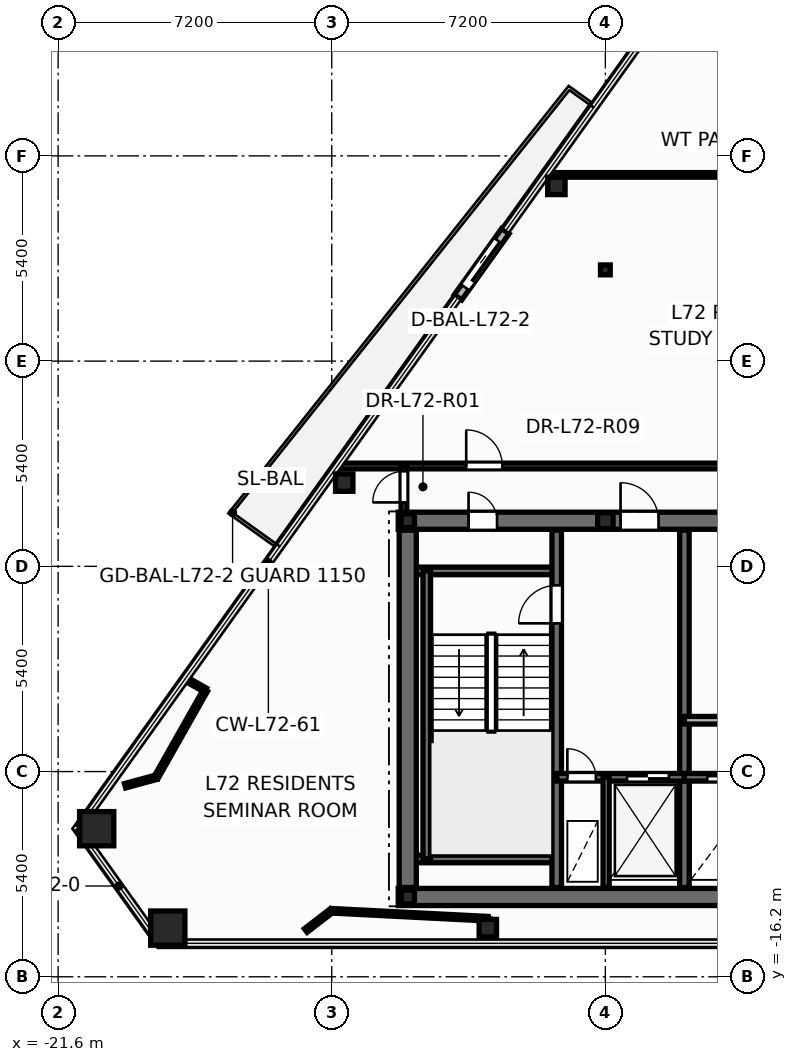
"""IFC4 building model, lengths in metres.
Left out: names, types, materials, properties, quantities, classifications, styles, units other than length and angle.
Written with IfcOpenShell. Run it as: python <this file> out.ifc"""

import sys

from ifc_helpers import new_model, si_unit, direction, frame, frame_2d, origin, origin_2d, place, context, subcontext, project, spatial, rectangle, hollow_rectangle, hollow_circle, i_section, extrude, element, fill, save


model = new_model("IFC4")
c1 = context("Model", 3, precision=1e-05, world=origin(), true_north=direction((0.0, 1.0)))
c2 = subcontext(c1, "Body", "Model", "MODEL_VIEW")
j1 = project(units=[si_unit("LENGTHUNIT", "METRE"), si_unit("PLANEANGLEUNIT", "RADIAN")], contexts=[c1])
p1 = place(None, origin())
s1 = spatial("IfcSite", under=j1, at=p1, CompositionType="ELEMENT")
p2 = place(p1, origin())
s2 = spatial("IfcBuilding", under=s1, at=p2, CompositionType="ELEMENT")
p3 = place(p2, frame((0.0, 0.0, 274.2)))
s3 = spatial("IfcBuildingStorey", under=s2, at=p3, CompositionType="ELEMENT", Elevation=274.2)
for number, where, z_axis, x_axis in (
    (1, (-20.585, -12.303, 0.0), (0.0, 0.0, 1.0), (1.0, 0.0, 0.0)),
    (2, (-18.714, -14.919, 0.0), (0.0, 0.0, 1.0), (1.0, 0.0, 0.0)),
):
    element("IfcColumn", number, at=place(p3, frame(where, z_axis=z_axis, x_axis=x_axis)), inside=s3, PredefinedType="COLUMN", context=c2, shape_type="SweptSolid", body=[
        extrude(hollow_rectangle(XDim=0.9, YDim=0.9, WallThickness=0.04, at=origin_2d()), origin(), (0.0, 0.0, 1.0), 3.6),
    ])
for number, where, z_axis, x_axis in (
    (3, (-10.293, -14.919, 0.0), (0.0, 0.0, 1.0), (1.0, 0.0, 0.0)),
    (4, (-8.489, 4.61, 0.0), (0.0, 0.0, 1.0), (1.0, 0.0, 0.0)),
    (5, (-14.072, -3.196, 0.0), (0.0, 0.0, 1.0), (1.0, 0.0, 0.0)),
):
    element("IfcColumn", number, at=place(p3, frame(where, z_axis=z_axis, x_axis=x_axis)), inside=s3, PredefinedType="COLUMN", context=c2, shape_type="SweptSolid", body=[
        extrude(hollow_circle(Radius=0.229, WallThickness=0.016, at=origin_2d()), origin(), (0.0, 0.0, 1.0), 3.6),
    ])
for number, where, z_axis, x_axis in (
    (6, (-12.4, -14.1, 0.0), (0.0, 0.0, 1.0), (1.0, 0.0, 0.0)),
    (7, (-12.4, -4.2, 0.0), (0.0, 0.0, 1.0), (1.0, 0.0, 0.0)),
):
    element("IfcColumn", number, at=place(p3, frame(where, z_axis=z_axis, x_axis=x_axis)), inside=s3, PredefinedType="COLUMN", context=c2, shape_type="SweptSolid", body=[
        extrude(i_section(OverallWidth=0.352, OverallDepth=0.359, WebThickness=0.018, FlangeThickness=0.026, at=origin_2d()), origin(), (0.0, 0.0, 1.0), 3.6),
    ])
p4 = place(p3, frame((-7.2, -4.2, 0.0), z_axis=(0.0, 0.0, 1.0), x_axis=(1.0, 0.0, 0.0)))
e8 = element("IfcColumn", 8, at=p4, inside=s3, PredefinedType="PILASTER", context=c2, shape_type="SweptSolid", body=[
    extrude(i_section(OverallWidth=0.405, OverallDepth=0.414, WebThickness=0.022, FlangeThickness=0.032, at=origin_2d()), origin(), (0.0, 0.0, 1.0), 3.6),
])
p5 = place(p3, frame((-7.2, 2.4, 0.0), z_axis=(0.0, 0.0, 1.0), x_axis=(1.0, 0.0, 0.0)))
e9 = element("IfcColumn", 9, at=p5, inside=s3, PredefinedType="COLUMN", context=c2, shape_type="SweptSolid", body=[
    extrude(i_section(OverallWidth=0.256, OverallDepth=0.26, WebThickness=0.01, FlangeThickness=0.017, at=origin_2d()), origin(), (0.0, 0.0, 1.0), 3.6),
])
p6 = place(p3, frame((-9.831, 3.42, -0.015), z_axis=(0.0, 0.0, 1.0), x_axis=(-0.581756116184, -0.81336327756, 0.0)))
e10 = element("IfcWall", 10, at=p6, inside=s3, PredefinedType="STANDARD", context=c2, shape_type="SweptSolid", body=[
    extrude(rectangle(XDim=2.14, YDim=0.24, at=frame_2d((1.07, 0.0))), origin(), (0.0, 0.0, 1.0), 2.878),
])
p7 = place(p6, frame((0.32, 0.0, 0.015)))
e11 = element("IfcOpeningElement", 11, at=p7, cuts=e10, PredefinedType="OPENING", context=c2, shape_type="SweptSolid", body=[
    extrude(rectangle(XDim=1.506, YDim=2.204, at=frame_2d((0.75, 1.102))), frame((0.0, 0.13, 0.0), z_axis=(0.0, -1.0, 0.0), x_axis=(1.0, 0.0, 0.0)), (0.0, 0.0, 1.0), 0.26),
])
p8 = place(p3, frame((-12.65, -14.1, 0.0), z_axis=(0.0, 0.0, 1.0), x_axis=(1.0, 0.0, 0.0)))
e12 = element("IfcWall", 12, at=p8, inside=s3, PredefinedType="SHEAR", context=c2, shape_type="SweptSolid", body=[
    extrude(rectangle(XDim=25.3, YDim=0.45, at=frame_2d((12.65, 0.0))), origin(), (0.0, 0.0, 1.0), 3.6),
])
p9 = place(p3, frame((-12.65, -4.2, 0.0), z_axis=(0.0, 0.0, 1.0), x_axis=(1.0, 0.0, 0.0)))
e13 = element("IfcWall", 13, at=p9, inside=s3, PredefinedType="SHEAR", context=c2, shape_type="SweptSolid", body=[
    extrude(rectangle(XDim=25.3, YDim=0.45, at=frame_2d((12.65, 0.0))), origin(), (0.0, 0.0, 1.0), 3.6),
])
p10 = place(p9, frame((1.85, 0.0, 0.0)))
e14 = element("IfcOpeningElement", 14, at=p10, cuts=e13, PredefinedType="OPENING", context=c2, shape_type="SweptSolid", body=[
    extrude(rectangle(XDim=0.756, YDim=2.054, at=frame_2d((0.375, 1.027))), frame((0.0, 0.235, 0.0), z_axis=(0.0, -1.0, 0.0), x_axis=(1.0, 0.0, 0.0)), (0.0, 0.0, 1.0), 0.47),
])
p11 = place(p9, frame((22.65, 0.0, 0.0)))
e15 = element("IfcOpeningElement", 15, at=p11, cuts=e13, PredefinedType="OPENING", context=c2, shape_type="SweptSolid", body=[
    extrude(rectangle(XDim=0.756, YDim=2.054, at=frame_2d((0.375, 1.027))), frame((0.0, 0.235, 0.0), z_axis=(0.0, -1.0, 0.0), x_axis=(1.0, 0.0, 0.0)), (0.0, 0.0, 1.0), 0.47),
])
p12 = place(p9, frame((5.85, 0.0, 0.0)))
e16 = element("IfcOpeningElement", 16, at=p12, cuts=e13, PredefinedType="OPENING", context=c2, shape_type="SweptSolid", body=[
    extrude(rectangle(XDim=1.006, YDim=2.104, at=frame_2d((0.5, 1.052))), frame((0.0, 0.235, 0.0), z_axis=(0.0, -1.0, 0.0), x_axis=(1.0, 0.0, 0.0)), (0.0, 0.0, 1.0), 0.47),
])
p13 = place(p9, frame((10.35, 0.0, 0.0)))
e17 = element("IfcOpeningElement", 17, at=p13, cuts=e13, PredefinedType="OPENING", context=c2, shape_type="SweptSolid", body=[
    extrude(rectangle(XDim=1.406, YDim=2.154, at=frame_2d((0.7, 1.077))), frame((0.0, 0.235, 0.0), z_axis=(0.0, -1.0, 0.0), x_axis=(1.0, 0.0, 0.0)), (0.0, 0.0, 1.0), 0.47),
])
p14 = place(p9, frame((18.45, 0.0, 0.0)))
e18 = element("IfcOpeningElement", 18, at=p14, cuts=e13, PredefinedType="OPENING", context=c2, shape_type="SweptSolid", body=[
    extrude(rectangle(XDim=1.006, YDim=2.104, at=frame_2d((0.5, 1.052))), frame((0.0, 0.235, 0.0), z_axis=(0.0, -1.0, 0.0), x_axis=(1.0, 0.0, 0.0)), (0.0, 0.0, 1.0), 0.47),
])
for number, where, z_axis, x_axis in (
    (19, (-12.35, -5.52, 0.0), (0.0, 0.0, 1.0), (1.0, 0.0, 0.0)),
    (20, (-12.35, -13.1, 0.0), (0.0, 0.0, 1.0), (1.0, 0.0, 0.0)),
):
    element("IfcWall", number, at=place(p3, frame(where, z_axis=z_axis, x_axis=x_axis)), inside=s3, PredefinedType="SOLIDWALL", context=c2, shape_type="SweptSolid", body=[
        extrude(rectangle(XDim=3.87, YDim=0.2, at=frame_2d((1.935, 0.0))), origin(), (0.0, 0.0, 1.0), 3.6),
    ])
p15 = place(p3, frame((-11.9, -13.1, 0.0), z_axis=(0.0, 0.0, 1.0), x_axis=(0.0, 1.0, 0.0)))
e21 = element("IfcWall", 21, at=p15, inside=s3, PredefinedType="SOLIDWALL", context=c2, shape_type="SweptSolid", body=[
    extrude(rectangle(XDim=7.58, YDim=0.2, at=frame_2d((3.79, 0.0))), origin(), (0.0, 0.0, 1.0), 3.6),
])
p16 = place(p3, frame((-8.48, -13.85, 0.0), z_axis=(0.0, 0.0, 1.0), x_axis=(0.0, 1.0, 0.0)))
e22 = element("IfcWall", 22, at=p16, inside=s3, PredefinedType="SHEAR", context=c2, shape_type="SweptSolid", body=[
    extrude(rectangle(XDim=9.4, YDim=0.25, at=frame_2d((4.7, 0.0))), origin(), (0.0, 0.0, 1.0), 3.6),
])
p17 = place(p16, frame((6.95, 0.0, 0.0)))
e23 = element("IfcOpeningElement", 23, at=p17, cuts=e22, PredefinedType="OPENING", context=c2, shape_type="SweptSolid", body=[
    extrude(rectangle(XDim=1.006, YDim=2.104, at=frame_2d((0.5, 1.052))), frame((0.0, 0.135, 0.0), z_axis=(0.0, -1.0, 0.0), x_axis=(1.0, 0.0, 0.0)), (0.0, 0.0, 1.0), 0.27),
])
p18 = place(p3, frame((-5.12, -13.85, 0.0), z_axis=(0.0, 0.0, 1.0), x_axis=(0.0, 1.0, 0.0)))
e24 = element("IfcWall", 24, at=p18, inside=s3, PredefinedType="SHEAR", context=c2, shape_type="SweptSolid", body=[
    extrude(rectangle(XDim=9.4, YDim=0.25, at=frame_2d((4.7, 0.0))), origin(), (0.0, 0.0, 1.0), 3.6),
])
p19 = place(p3, frame((-8.48, -10.95, 0.0), z_axis=(0.0, 0.0, 1.0), x_axis=(1.0, 0.0, 0.0)))
e25 = element("IfcWall", 25, at=p19, inside=s3, PredefinedType="SOLIDWALL", context=c2, shape_type="SweptSolid", body=[
    extrude(rectangle(XDim=3.36, YDim=0.2, at=frame_2d((1.68, 0.0))), origin(), (0.0, 0.0, 1.0), 3.6),
])
p20 = place(p19, frame((0.28, 0.0, 0.0)))
e26 = element("IfcOpeningElement", 26, at=p20, cuts=e25, PredefinedType="OPENING", context=c2, shape_type="SweptSolid", body=[
    extrude(rectangle(XDim=0.756, YDim=2.054, at=frame_2d((0.375, 1.027))), frame((0.0, 0.11, 0.0), z_axis=(0.0, -1.0, 0.0), x_axis=(1.0, 0.0, 0.0)), (0.0, 0.0, 1.0), 0.22),
])
p21 = place(p19, frame((1.85, 0.0, 0.0)))
e27 = element("IfcOpeningElement", 27, at=p21, cuts=e25, PredefinedType="OPENING", context=c2, shape_type="SweptSolid", body=[
    extrude(rectangle(XDim=1.106, YDim=2.104, at=frame_2d((0.55, 1.052))), frame((0.0, 0.11, 0.0), z_axis=(0.0, -1.0, 0.0), x_axis=(1.0, 0.0, 0.0)), (0.0, 0.0, 1.0), 0.22),
])
p22 = place(p3, frame((-5.12, -10.95, 0.0), z_axis=(0.0, 0.0, 1.0), x_axis=(1.0, 0.0, 0.0)))
e28 = element("IfcWall", 28, at=p22, inside=s3, PredefinedType="SOLIDWALL", context=c2, shape_type="SweptSolid", body=[
    extrude(rectangle(XDim=10.24, YDim=0.2, at=frame_2d((5.12, 0.0))), origin(), (0.0, 0.0, 1.0), 3.6),
])
p23 = place(p22, frame((0.6, 0.0, 0.0)))
e29 = element("IfcOpeningElement", 29, at=p23, cuts=e28, PredefinedType="OPENING", context=c2, shape_type="SweptSolid", body=[
    extrude(rectangle(XDim=1.106, YDim=2.104, at=frame_2d((0.55, 1.052))), frame((0.0, 0.11, 0.0), z_axis=(0.0, -1.0, 0.0), x_axis=(1.0, 0.0, 0.0)), (0.0, 0.0, 1.0), 0.22),
])
p24 = place(p22, frame((2.67, 0.0, 0.0)))
e30 = element("IfcOpeningElement", 30, at=p24, cuts=e28, PredefinedType="OPENING", context=c2, shape_type="SweptSolid", body=[
    extrude(rectangle(XDim=1.106, YDim=2.104, at=frame_2d((0.55, 1.052))), frame((0.0, 0.11, 0.0), z_axis=(0.0, -1.0, 0.0), x_axis=(1.0, 0.0, 0.0)), (0.0, 0.0, 1.0), 0.22),
])
p25 = place(p22, frame((4.57, 0.0, 0.0)))
e31 = element("IfcOpeningElement", 31, at=p25, cuts=e28, PredefinedType="OPENING", context=c2, shape_type="SweptSolid", body=[
    extrude(rectangle(XDim=1.106, YDim=2.104, at=frame_2d((0.55, 1.052))), frame((0.0, 0.11, 0.0), z_axis=(0.0, -1.0, 0.0), x_axis=(1.0, 0.0, 0.0)), (0.0, 0.0, 1.0), 0.22),
])
p26 = place(p22, frame((6.47, 0.0, 0.0)))
e32 = element("IfcOpeningElement", 32, at=p26, cuts=e28, PredefinedType="OPENING", context=c2, shape_type="SweptSolid", body=[
    extrude(rectangle(XDim=1.106, YDim=2.104, at=frame_2d((0.55, 1.052))), frame((0.0, 0.11, 0.0), z_axis=(0.0, -1.0, 0.0), x_axis=(1.0, 0.0, 0.0)), (0.0, 0.0, 1.0), 0.22),
])
p27 = place(p22, frame((8.54, 0.0, 0.0)))
e33 = element("IfcOpeningElement", 33, at=p27, cuts=e28, PredefinedType="OPENING", context=c2, shape_type="SweptSolid", body=[
    extrude(rectangle(XDim=1.106, YDim=2.104, at=frame_2d((0.55, 1.052))), frame((0.0, 0.11, 0.0), z_axis=(0.0, -1.0, 0.0), x_axis=(1.0, 0.0, 0.0)), (0.0, 0.0, 1.0), 0.22),
])
p28 = place(p3, frame((-7.18, -13.85, 0.0), z_axis=(0.0, 0.0, 1.0), x_axis=(0.0, 1.0, 0.0)))
e34 = element("IfcWall", 34, at=p28, inside=s3, PredefinedType="PARTITIONING", context=c2, shape_type="SweptSolid", body=[
    extrude(rectangle(XDim=2.9, YDim=0.16, at=frame_2d((1.45, 0.0))), origin(), (0.0, 0.0, 1.0), 2.57),
])
p29 = place(p3, frame((-12.4, -13.85, 0.0), z_axis=(0.0, 0.0, 1.0), x_axis=(0.0, 1.0, 0.0)))
e35 = element("IfcWall", 35, at=p29, inside=s3, PredefinedType="SHEAR", context=c2, shape_type="SweptSolid", body=[
    extrude(rectangle(XDim=9.4, YDim=0.45, at=frame_2d((4.7, 0.0))), origin(), (0.0, 0.0, 1.0), 3.6),
])
p30 = place(p3, frame((-5.12, -9.45, 0.0), z_axis=(0.0, 0.0, 1.0), x_axis=(1.0, 0.0, 0.0)))
e36 = element("IfcWall", 36, at=p30, inside=s3, PredefinedType="SOLIDWALL", context=c2, shape_type="SweptSolid", body=[
    extrude(rectangle(XDim=2.24, YDim=0.2, at=frame_2d((1.12, 0.0))), origin(), (0.0, 0.0, 1.0), 3.345),
])
p31 = place(p3, frame((-14.251, -2.76, 0.0), z_axis=(0.0, 0.0, 1.0), x_axis=(1.0, 0.0, 0.0)))
e37 = element("IfcWall", 37, at=p31, inside=s3, PredefinedType="PARTITIONING", context=c2, shape_type="SweptSolid", body=[
    extrude(rectangle(XDim=14.891, YDim=0.15, at=frame_2d((7.446, 0.0))), origin(), (0.0, 0.0, 1.0), 2.32),
])
p32 = place(p31, frame((3.39, 0.0, 0.0)))
e38 = element("IfcOpeningElement", 38, at=p32, cuts=e37, PredefinedType="OPENING", context=c2, shape_type="SweptSolid", body=[
    extrude(rectangle(XDim=0.956, YDim=2.104, at=frame_2d((0.475, 1.052))), frame((0.0, 0.085, 0.0), z_axis=(0.0, -1.0, 0.0), x_axis=(1.0, 0.0, 0.0)), (0.0, 0.0, 1.0), 0.17),
])
p33 = place(p3, frame((-8.773, 4.9, 0.0), z_axis=(0.0, 0.0, 1.0), x_axis=(1.0, 0.0, 0.0)))
e39 = element("IfcWall", 39, at=p33, inside=s3, PredefinedType="PARTITIONING", context=c2, shape_type="SweptSolid", body=[
    extrude(rectangle(XDim=9.413, YDim=0.12, at=frame_2d((4.706, 0.0))), origin(), (0.0, 0.0, 1.0), 2.32),
])
p34 = place(p3, frame((-14.409, -14.463, 0.0), z_axis=(0.0, 0.0, 1.0), x_axis=(0.998709464059, -0.050787856814, 0.0)))
e40 = element("IfcWall", 40, at=p34, inside=s3, PredefinedType="PARTITIONING", context=c2, shape_type="SweptSolid", body=[
    extrude(rectangle(XDim=4.125, YDim=0.12, at=frame_2d((2.062, 0.0))), origin(), (0.0, 0.0, 1.0), 2.32),
])
p35 = place(p3, frame((-17.721, -8.659, 0.0), z_axis=(0.0, 0.0, 1.0), x_axis=(-0.492860512567, -0.870108335297, 0.0)))
e41 = element("IfcWall", 41, at=p35, inside=s3, PredefinedType="PARTITIONING", context=c2, shape_type="SweptSolid", body=[
    extrude(rectangle(XDim=2.633, YDim=0.12, at=frame_2d((1.317, 0.0))), origin(), (0.0, 0.0, 1.0), 2.32),
])
p36 = place(p3, frame((-12.5, -4.24, 0.0), z_axis=(0.0, 0.0, 1.0), x_axis=(0.0, 1.0, 0.0)))
e42 = element("IfcWall", 42, at=p36, inside=s3, PredefinedType="PARTITIONING", context=c2, shape_type="SweptSolid", body=[
    extrude(rectangle(XDim=1.48, YDim=0.15, at=frame_2d((0.74, 0.0))), origin(), (0.0, 0.0, 1.0), 2.32),
])
p37 = place(p36, frame((0.522, 0.0, 0.0)))
e43 = element("IfcOpeningElement", 43, at=p37, cuts=e42, PredefinedType="OPENING", context=c2, shape_type="SweptSolid", body=[
    extrude(rectangle(XDim=0.826, YDim=2.104, at=frame_2d((0.41, 1.052))), frame((0.0, 0.085, 0.0), z_axis=(0.0, -1.0, 0.0), x_axis=(1.0, 0.0, 0.0)), (0.0, 0.0, 1.0), 0.17),
])
p38 = place(p3, frame((-15.084, -14.982, 0.0), z_axis=(0.0, 0.0, 1.0), x_axis=(0.792229581797, 0.610223147484, 0.0)))
e44 = element("IfcWall", 44, at=p38, inside=s3, PredefinedType="PARTITIONING", context=c2, shape_type="SweptSolid", body=[
    extrude(rectangle(XDim=0.852, YDim=0.12, at=frame_2d((0.426, 0.0))), origin(), (0.0, 0.0, 1.0), 2.32),
])
p39 = place(p3, frame((-19.019, -10.95, 0.0), z_axis=(0.0, 0.0, 1.0), x_axis=(-0.964783720957, -0.263044429283, 0.0)))
e45 = element("IfcWall", 45, at=p39, inside=s3, PredefinedType="PARTITIONING", context=c2, shape_type="SweptSolid", body=[
    extrude(rectangle(XDim=0.849, YDim=0.12, at=frame_2d((0.425, 0.0))), origin(), (0.0, 0.0, 1.0), 2.32),
])
p40 = place(p3, frame((-10.29, -14.672, 0.0), z_axis=(0.0, 0.0, 1.0), x_axis=(-0.050930748048, -0.998702187293, 0.0)))
e46 = element("IfcWall", 46, at=p40, inside=s3, PredefinedType="PARTITIONING", context=c2, shape_type="SweptSolid", body=[
    extrude(rectangle(XDim=0.637, YDim=0.12, at=frame_2d((0.319, 0.0))), origin(), (0.0, 0.0, 1.0), 2.32),
])
p41 = place(p3, frame((-18.246, -8.362, 0.0), z_axis=(0.0, 0.0, 1.0), x_axis=(0.870230638559, -0.492644532816, 0.0)))
e47 = element("IfcWall", 47, at=p41, inside=s3, PredefinedType="PARTITIONING", context=c2, shape_type="SweptSolid", body=[
    extrude(rectangle(XDim=0.603, YDim=0.12, at=frame_2d((0.301, 0.0))), origin(), (0.0, 0.0, 1.0), 2.863),
])
p42 = place(p7, origin())
e48 = element("IfcDoor", 48, at=p42, inside=s3, OperationType="SLIDING_TO_RIGHT", PredefinedType="DOOR", context=c2, shape_type="SweptSolid", body=[
    extrude(rectangle(XDim=1.5, YDim=2.2, at=frame_2d((0.75, 1.1))), frame((0.0, 0.025, 0.0), z_axis=(0.0, -1.0, 0.0), x_axis=(1.0, 0.0, 0.0)), (0.0, 0.0, 1.0), 0.05),
])
fill(e11, e48)
p43 = place(p17, origin())
e49 = element("IfcDoor", 49, at=p43, inside=s3, OperationType="SINGLE_SWING_LEFT", PredefinedType="DOOR", context=c2, shape_type="SweptSolid", body=[
    extrude(rectangle(XDim=1.0, YDim=2.1, at=frame_2d((0.5, 1.05))), frame((0.0, 0.025, 0.0), z_axis=(0.0, -1.0, 0.0), x_axis=(1.0, 0.0, 0.0)), (0.0, 0.0, 1.0), 0.05),
])
fill(e23, e49)
p44 = place(p20, origin())
e50 = element("IfcDoor", 50, at=p44, inside=s3, OperationType="SINGLE_SWING_LEFT", PredefinedType="DOOR", context=c2, shape_type="SweptSolid", body=[
    extrude(rectangle(XDim=0.75, YDim=2.05, at=frame_2d((0.375, 1.025))), frame((0.0, 0.025, 0.0), z_axis=(0.0, -1.0, 0.0), x_axis=(1.0, 0.0, 0.0)), (0.0, 0.0, 1.0), 0.05),
])
fill(e26, e50)
p45 = place(p21, origin())
e51 = element("IfcDoor", 51, at=p45, inside=s3, OperationType="DOUBLE_DOOR_SLIDING", PredefinedType="DOOR", context=c2, shape_type="SweptSolid", body=[
    extrude(rectangle(XDim=1.1, YDim=2.1, at=frame_2d((0.55, 1.05))), frame((0.0, 0.025, 0.0), z_axis=(0.0, -1.0, 0.0), x_axis=(1.0, 0.0, 0.0)), (0.0, 0.0, 1.0), 0.05),
])
fill(e27, e51)
p46 = place(p23, origin())
e52 = element("IfcDoor", 52, at=p46, inside=s3, OperationType="DOUBLE_DOOR_SLIDING", PredefinedType="DOOR", context=c2, shape_type="SweptSolid", body=[
    extrude(rectangle(XDim=1.1, YDim=2.1, at=frame_2d((0.55, 1.05))), frame((0.0, 0.025, 0.0), z_axis=(0.0, -1.0, 0.0), x_axis=(1.0, 0.0, 0.0)), (0.0, 0.0, 1.0), 0.05),
])
fill(e29, e52)
p47 = place(p10, origin())
e53 = element("IfcDoor", 53, at=p47, inside=s3, OperationType="SINGLE_SWING_LEFT", PredefinedType="DOOR", context=c2, shape_type="SweptSolid", body=[
    extrude(rectangle(XDim=0.75, YDim=2.05, at=frame_2d((0.375, 1.025))), frame((0.0, 0.025, 0.0), z_axis=(0.0, -1.0, 0.0), x_axis=(1.0, 0.0, 0.0)), (0.0, 0.0, 1.0), 0.05),
])
fill(e14, e53)
p48 = place(p12, origin())
e54 = element("IfcDoor", 54, at=p48, inside=s3, OperationType="SINGLE_SWING_LEFT", PredefinedType="DOOR", context=c2, shape_type="SweptSolid", body=[
    extrude(rectangle(XDim=1.0, YDim=2.1, at=frame_2d((0.5, 1.05))), frame((0.0, 0.025, 0.0), z_axis=(0.0, -1.0, 0.0), x_axis=(1.0, 0.0, 0.0)), (0.0, 0.0, 1.0), 0.05),
])
fill(e16, e54)
p49 = place(p37, origin())
e55 = element("IfcDoor", 55, at=p49, inside=s3, OperationType="SINGLE_SWING_LEFT", PredefinedType="DOOR", context=c2, shape_type="SweptSolid", body=[
    extrude(rectangle(XDim=0.82, YDim=2.1, at=frame_2d((0.41, 1.05))), frame((0.0, 0.025, 0.0), z_axis=(0.0, -1.0, 0.0), x_axis=(1.0, 0.0, 0.0)), (0.0, 0.0, 1.0), 0.05),
])
fill(e43, e55)
p50 = place(p32, origin())
e56 = element("IfcDoor", 56, at=p50, inside=s3, OperationType="SINGLE_SWING_LEFT", PredefinedType="DOOR", context=c2, shape_type="SweptSolid", body=[
    extrude(rectangle(XDim=0.95, YDim=2.1, at=frame_2d((0.475, 1.05))), frame((0.0, 0.025, 0.0), z_axis=(0.0, -1.0, 0.0), x_axis=(1.0, 0.0, 0.0)), (0.0, 0.0, 1.0), 0.05),
])
fill(e38, e56)
save(model, sys.argv[1])
